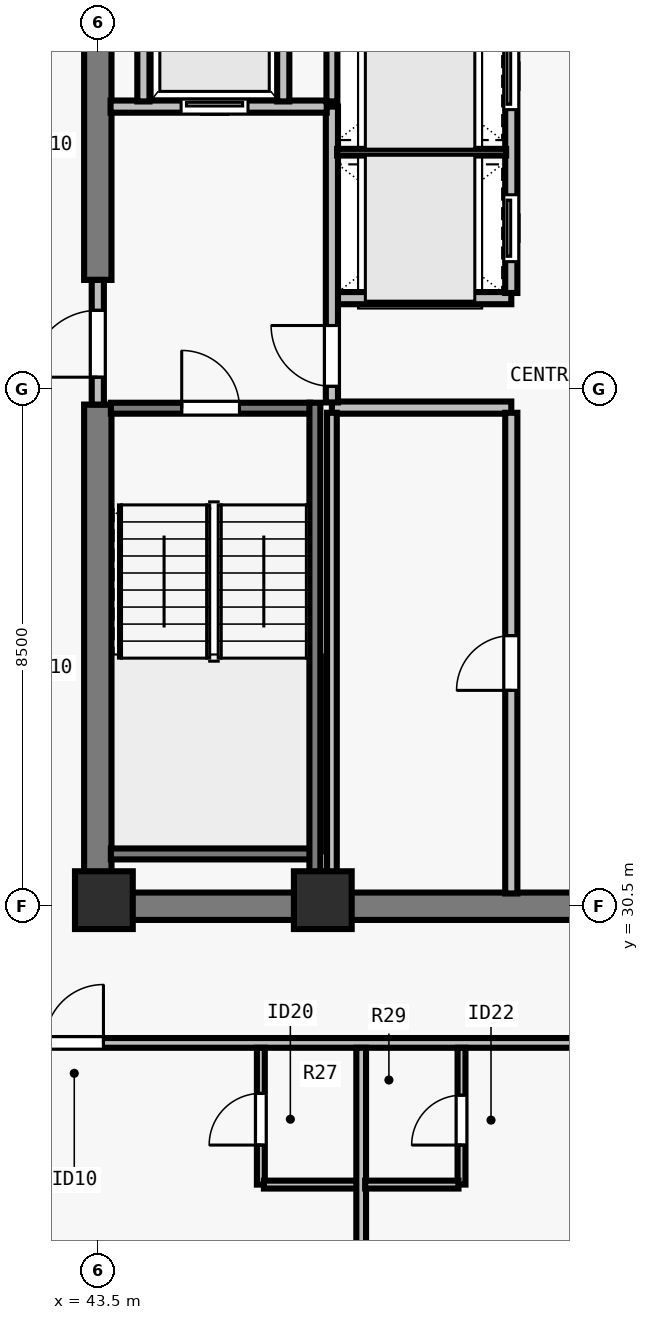
"""IFC4 building model, lengths in metres.
Left out: names, types, materials, properties, quantities, classifications, styles, units other than length and angle.
Written with IfcOpenShell. Run it as: python <this file> out.ifc"""

import sys

from ifc_helpers import new_model, si_unit, direction, frame, frame_2d, origin, origin_2d, place, context, subcontext, project, spatial, rectangle, extrude, element, fill, save


model = new_model("IFC4")
c1 = context("Model", 3, precision=1e-05, world=origin(), true_north=direction((0.0, 1.0)))
c2 = subcontext(c1, "Body", "Model", "MODEL_VIEW")
j1 = project(units=[si_unit("LENGTHUNIT", "METRE"), si_unit("PLANEANGLEUNIT", "RADIAN")], contexts=[c1])
p1 = place(None, origin())
s1 = spatial("IfcSite", under=j1, at=p1, CompositionType="ELEMENT")
p2 = place(p1, origin())
s2 = spatial("IfcBuilding", under=s1, at=p2, CompositionType="ELEMENT")
p3 = place(p2, frame((0.0, 0.0, 244.5)))
s3 = spatial("IfcBuildingStorey", under=s2, at=p3, CompositionType="ELEMENT", Elevation=244.5)
for number, where, z_axis, x_axis in (
    (1, (43.6, 30.6, 0.0), (0.0, 0.0, 1.0), (1.0, 0.0, 0.0)),
    (2, (47.2, 30.6, 0.0), (0.0, 0.0, 1.0), (1.0, 0.0, 0.0)),
):
    element("IfcColumn", number, at=place(p3, frame(where, z_axis=z_axis, x_axis=x_axis)), inside=s3, PredefinedType="COLUMN", context=c2, shape_type="SweptSolid", body=[
        extrude(rectangle(XDim=0.95, YDim=0.95, at=origin_2d()), origin(), (0.0, 0.0, 1.0), 3.5),
    ])
p4 = place(p3, frame((43.275, 30.5, 0.0), z_axis=(0.0, 0.0, 1.0), x_axis=(1.0, 0.0, 0.0)))
e3 = element("IfcWall", 3, at=p4, inside=s3, PredefinedType="SHEAR", context=c2, shape_type="SweptSolid", body=[
    extrude(rectangle(XDim=17.45, YDim=0.45, at=frame_2d((8.725, 0.0))), origin(), (0.0, 0.0, 1.0), 3.29),
])
p5 = place(p3, frame((43.5, 30.715, 0.0), z_axis=(0.0, 0.0, 1.0), x_axis=(0.0, 1.0, 0.0)))
e4 = element("IfcWall", 4, at=p5, inside=s3, PredefinedType="SHEAR", context=c2, shape_type="SweptSolid", body=[
    extrude(rectangle(XDim=8.035, YDim=0.45, at=frame_2d((4.018, 0.0))), origin(), (0.0, 0.0, 1.0), 3.29),
])
p6 = place(p3, frame((43.5, 40.8, 0.0), z_axis=(0.0, 0.0, 1.0), x_axis=(0.0, 1.0, 0.0)))
e5 = element("IfcWall", 5, at=p6, inside=s3, PredefinedType="SHEAR", context=c2, shape_type="SweptSolid", body=[
    extrude(rectangle(XDim=6.485, YDim=0.45, at=frame_2d((3.242, 0.0))), origin(), (0.0, 0.0, 1.0), 3.29),
])
for number, where, z_axis, x_axis in (
    (6, (47.35, 38.7, 0.0), (0.0, 0.0, 1.0), (1.0, 0.0, 0.0)),
    (7, (47.35, 40.5, 0.0), (0.0, 0.0, 1.0), (1.0, 0.0, 0.0)),
):
    element("IfcWall", number, at=place(p3, frame(where, z_axis=z_axis, x_axis=x_axis)), inside=s3, PredefinedType="SOLIDWALL", context=c2, shape_type="SweptSolid", body=[
        extrude(rectangle(XDim=2.95, YDim=0.2, at=frame_2d((1.475, 0.0))), origin(), (0.0, 0.0, 1.0), 3.29),
    ])
p7 = place(p3, frame((50.3, 30.71, 0.0), z_axis=(0.0, 0.0, 1.0), x_axis=(0.0, 1.0, 0.0)))
e8 = element("IfcWall", 8, at=p7, inside=s3, PredefinedType="SOLIDWALL", context=c2, shape_type="SweptSolid", body=[
    extrude(rectangle(XDim=7.905, YDim=0.2, at=frame_2d((3.953, 0.0))), origin(), (0.0, 0.0, 1.0), 3.29),
])
p8 = place(p7, frame((3.34, 0.0, 0.0)))
e9 = element("IfcOpeningElement", 9, at=p8, cuts=e8, PredefinedType="OPENING", context=c2, shape_type="SweptSolid", body=[
    extrude(rectangle(XDim=0.9, YDim=2.12, at=frame_2d((0.45, 1.06))), frame((0.0, 0.11, 0.0), z_axis=(0.0, -1.0, 0.0), x_axis=(1.0, 0.0, 0.0)), (0.0, 0.0, 1.0), 0.22),
])
p9 = place(p3, frame((50.3, 40.585, 0.0), z_axis=(0.0, 0.0, 1.0), x_axis=(0.0, 1.0, 0.0)))
e10 = element("IfcWall", 10, at=p9, inside=s3, PredefinedType="SOLIDWALL", context=c2, shape_type="SweptSolid", body=[
    extrude(rectangle(XDim=6.705, YDim=0.2, at=frame_2d((3.353, 0.0))), origin(), (0.0, 0.0, 1.0), 3.29),
])
p10 = place(p9, frame((0.515, 0.0, 0.0)))
e11 = element("IfcOpeningElement", 11, at=p10, cuts=e10, PredefinedType="OPENING", context=c2, shape_type="SweptSolid", body=[
    extrude(rectangle(XDim=1.1, YDim=2.2, at=frame_2d((0.55, 1.1))), frame((0.0, 0.11, 0.0), z_axis=(0.0, -1.0, 0.0), x_axis=(1.0, 0.0, 0.0)), (0.0, 0.0, 1.0), 0.22),
])
p11 = place(p9, frame((3.015, 0.0, 0.0)))
e12 = element("IfcOpeningElement", 12, at=p11, cuts=e10, PredefinedType="OPENING", context=c2, shape_type="SweptSolid", body=[
    extrude(rectangle(XDim=1.1, YDim=2.2, at=frame_2d((0.55, 1.1))), frame((0.0, 0.11, 0.0), z_axis=(0.0, -1.0, 0.0), x_axis=(1.0, 0.0, 0.0)), (0.0, 0.0, 1.0), 0.22),
])
p12 = place(p9, frame((5.065, 0.0, 0.0)))
e13 = element("IfcOpeningElement", 13, at=p12, cuts=e10, PredefinedType="OPENING", context=c2, shape_type="SweptSolid", body=[
    extrude(rectangle(XDim=0.8, YDim=2.08, at=frame_2d((0.4, 1.04))), frame((0.0, 0.11, 0.0), z_axis=(0.0, -1.0, 0.0), x_axis=(1.0, 0.0, 0.0)), (0.0, 0.0, 1.0), 0.22),
])
p13 = place(p3, frame((43.5, 38.75, 0.0), z_axis=(0.0, 0.0, 1.0), x_axis=(0.0, 1.0, 0.0)))
e14 = element("IfcWall", 14, at=p13, inside=s3, PredefinedType="SOLIDWALL", context=c2, shape_type="SweptSolid", body=[
    extrude(rectangle(XDim=2.05, YDim=0.2, at=frame_2d((1.025, 0.0))), origin(), (0.0, 0.0, 1.0), 3.29),
])
p14 = place(p13, frame((0.45, 0.0, 0.0)))
e15 = element("IfcOpeningElement", 15, at=p14, cuts=e14, PredefinedType="OPENING", context=c2, shape_type="SweptSolid", body=[
    extrude(rectangle(XDim=1.1, YDim=2.15, at=frame_2d((0.55, 1.075))), frame((0.0, 0.11, 0.0), z_axis=(0.0, -1.0, 0.0), x_axis=(1.0, 0.0, 0.0)), (0.0, 0.0, 1.0), 0.22),
])
p15 = place(p3, frame((47.35, 38.785, 0.0), z_axis=(0.0, 0.0, 1.0), x_axis=(0.0, 1.0, 0.0)))
e16 = element("IfcWall", 16, at=p15, inside=s3, PredefinedType="SOLIDWALL", context=c2, shape_type="SweptSolid", body=[
    extrude(rectangle(XDim=4.865, YDim=0.2, at=frame_2d((2.433, 0.0))), origin(), (0.0, 0.0, 1.0), 3.29),
])
p16 = place(p15, frame((0.265, 0.0, 0.0)))
e17 = element("IfcOpeningElement", 17, at=p16, cuts=e16, PredefinedType="OPENING", context=c2, shape_type="SweptSolid", body=[
    extrude(rectangle(XDim=1.0, YDim=2.15, at=frame_2d((0.5, 1.075))), frame((0.0, 0.11, 0.0), z_axis=(0.0, -1.0, 0.0), x_axis=(1.0, 0.0, 0.0)), (0.0, 0.0, 1.0), 0.22),
])
p17 = place(p3, frame((43.71, 43.65, 0.0), z_axis=(0.0, 0.0, 1.0), x_axis=(1.0, 0.0, 0.0)))
e18 = element("IfcWall", 18, at=p17, inside=s3, PredefinedType="SOLIDWALL", context=c2, shape_type="SweptSolid", body=[
    extrude(rectangle(XDim=3.555, YDim=0.2, at=frame_2d((1.777, 0.0))), origin(), (0.0, 0.0, 1.0), 3.29),
])
p18 = place(p17, frame((1.16, 0.0, 0.0)))
e19 = element("IfcOpeningElement", 19, at=p18, cuts=e18, PredefinedType="OPENING", context=c2, shape_type="SweptSolid", body=[
    extrude(rectangle(XDim=1.1, YDim=2.2, at=frame_2d((0.55, 1.1))), frame((0.0, 0.11, 0.0), z_axis=(0.0, -1.0, 0.0), x_axis=(1.0, 0.0, 0.0)), (0.0, 0.0, 1.0), 0.22),
])
for number, where, z_axis, x_axis in (
    (20, (46.55, 43.735, 0.0), (0.0, 0.0, 1.0), (0.0, 1.0, 0.0)),
    (21, (44.25, 43.735, 0.0), (0.0, 0.0, 1.0), (0.0, 1.0, 0.0)),
):
    element("IfcWall", number, at=place(p3, frame(where, z_axis=z_axis, x_axis=x_axis)), inside=s3, PredefinedType="SOLIDWALL", context=c2, shape_type="SweptSolid", body=[
        extrude(rectangle(XDim=3.555, YDim=0.2, at=frame_2d((1.777, 0.0))), origin(), (0.0, 0.0, 1.0), 3.29),
    ])
p19 = place(p3, frame((47.35, 30.71, 0.0), z_axis=(0.0, 0.0, 1.0), x_axis=(0.0, 1.0, 0.0)))
e22 = element("IfcWall", 22, at=p19, inside=s3, PredefinedType="PARTITIONING", context=c2, shape_type="SweptSolid", body=[
    extrude(rectangle(XDim=7.905, YDim=0.16, at=frame_2d((3.953, 0.0))), origin(), (0.0, 0.0, 1.0), 3.29),
])
p20 = place(p3, frame((47.35, 43.735, 0.0), z_axis=(0.0, 0.0, 1.0), x_axis=(0.0, 1.0, 0.0)))
e23 = element("IfcWall", 23, at=p20, inside=s3, PredefinedType="SOLIDWALL", context=c2, shape_type="SweptSolid", body=[
    extrude(rectangle(XDim=3.555, YDim=0.18, at=frame_2d((1.777, 0.0))), origin(), (0.0, 0.0, 1.0), 3.29),
])
p21 = place(p3, frame((47.435, 42.9, 0.0), z_axis=(0.0, 0.0, 1.0), x_axis=(1.0, 0.0, 0.0)))
e24 = element("IfcWall", 24, at=p21, inside=s3, PredefinedType="PARTITIONING", context=c2, shape_type="SweptSolid", body=[
    extrude(rectangle(XDim=2.78, YDim=0.11, at=frame_2d((1.39, 0.0))), origin(), (0.0, 0.0, 1.0), 3.29),
])
p22 = place(p3, frame((29.805, 28.252, 0.0), z_axis=(0.0, 0.0, 1.0), x_axis=(1.0, 0.0, 0.0)))
e25 = element("IfcWall", 25, at=p22, inside=s3, PredefinedType="PARTITIONING", context=c2, shape_type="SweptSolid", body=[
    extrude(rectangle(XDim=44.39, YDim=0.16, at=frame_2d((22.195, 0.0))), origin(), (0.0, 0.0, 1.0), 2.958),
])
p23 = place(p22, frame((3.872, 0.0, 0.0)))
e26 = element("IfcOpeningElement", 26, at=p23, cuts=e25, PredefinedType="OPENING", context=c2, shape_type="SweptSolid", body=[
    extrude(rectangle(XDim=0.96, YDim=2.18, at=frame_2d((0.48, 1.09))), frame((0.0, 0.09, 0.0), z_axis=(0.0, -1.0, 0.0), x_axis=(1.0, 0.0, 0.0)), (0.0, 0.0, 1.0), 0.18),
])
p24 = place(p22, frame((12.828, 0.0, 0.0)))
e27 = element("IfcOpeningElement", 27, at=p24, cuts=e25, PredefinedType="OPENING", context=c2, shape_type="SweptSolid", body=[
    extrude(rectangle(XDim=0.96, YDim=2.18, at=frame_2d((0.48, 1.09))), frame((0.0, 0.09, 0.0), z_axis=(0.0, -1.0, 0.0), x_axis=(1.0, 0.0, 0.0)), (0.0, 0.0, 1.0), 0.18),
])
p25 = place(p22, frame((21.66, 0.0, 0.0)))
e28 = element("IfcOpeningElement", 28, at=p25, cuts=e25, PredefinedType="OPENING", context=c2, shape_type="SweptSolid", body=[
    extrude(rectangle(XDim=0.96, YDim=2.18, at=frame_2d((0.48, 1.09))), frame((0.0, 0.09, 0.0), z_axis=(0.0, -1.0, 0.0), x_axis=(1.0, 0.0, 0.0)), (0.0, 0.0, 1.0), 0.18),
])
p26 = place(p22, frame((30.492, 0.0, 0.0)))
e29 = element("IfcOpeningElement", 29, at=p26, cuts=e25, PredefinedType="OPENING", context=c2, shape_type="SweptSolid", body=[
    extrude(rectangle(XDim=0.96, YDim=2.18, at=frame_2d((0.48, 1.09))), frame((0.0, 0.09, 0.0), z_axis=(0.0, -1.0, 0.0), x_axis=(1.0, 0.0, 0.0)), (0.0, 0.0, 1.0), 0.18),
])
p27 = place(p22, frame((39.503, 0.0, 0.0)))
e30 = element("IfcOpeningElement", 30, at=p27, cuts=e25, PredefinedType="OPENING", context=c2, shape_type="SweptSolid", body=[
    extrude(rectangle(XDim=0.96, YDim=2.18, at=frame_2d((0.48, 1.09))), frame((0.0, 0.09, 0.0), z_axis=(0.0, -1.0, 0.0), x_axis=(1.0, 0.0, 0.0)), (0.0, 0.0, 1.0), 0.18),
])
p28 = place(p3, frame((46.181, 25.923, 0.0), z_axis=(0.0, 0.0, 1.0), x_axis=(0.0, 1.0, 0.0)))
e31 = element("IfcWall", 31, at=p28, inside=s3, PredefinedType="PLUMBINGWALL", context=c2, shape_type="SweptSolid", body=[
    extrude(rectangle(XDim=2.25, YDim=0.13, at=frame_2d((1.125, 0.0))), origin(), (0.0, 0.0, 1.0), 3.29),
])
p29 = place(p28, frame((0.65, 0.0, 0.0)))
e32 = element("IfcOpeningElement", 32, at=p29, cuts=e31, PredefinedType="OPENING", context=c2, shape_type="SweptSolid", body=[
    extrude(rectangle(XDim=0.85, YDim=2.1, at=frame_2d((0.425, 1.05))), frame((0.0, 0.075, 0.0), z_axis=(0.0, -1.0, 0.0), x_axis=(1.0, 0.0, 0.0)), (0.0, 0.0, 1.0), 0.15),
])
p30 = place(p3, frame((46.231, 25.923, 0.0), z_axis=(0.0, 0.0, 1.0), x_axis=(1.0, 0.0, 0.0)))
e33 = element("IfcWall", 33, at=p30, inside=s3, PredefinedType="PLUMBINGWALL", context=c2, shape_type="SweptSolid", body=[
    extrude(rectangle(XDim=1.6, YDim=0.13, at=frame_2d((0.8, 0.0))), origin(), (0.0, 0.0, 1.0), 3.29),
])
p31 = place(p3, frame((47.832, 16.805, 0.0), z_axis=(0.0, 0.0, 1.0), x_axis=(0.0, 1.0, 0.0)))
e34 = element("IfcWall", 34, at=p31, inside=s3, PredefinedType="PARTITIONING", context=c2, shape_type="SweptSolid", body=[
    extrude(rectangle(XDim=11.368, YDim=0.16, at=frame_2d((5.684, 0.0))), origin(), (0.0, 0.0, 1.0), 2.958),
])
p32 = place(p3, frame((49.481, 25.923, 0.0), z_axis=(0.0, 0.0, 1.0), x_axis=(0.0, 1.0, 0.0)))
e35 = element("IfcWall", 35, at=p32, inside=s3, PredefinedType="PLUMBINGWALL", context=c2, shape_type="SweptSolid", body=[
    extrude(rectangle(XDim=2.25, YDim=0.13, at=frame_2d((1.125, 0.0))), origin(), (0.0, 0.0, 1.0), 3.29),
])
p33 = place(p32, frame((0.65, 0.0, 0.0)))
e36 = element("IfcOpeningElement", 36, at=p33, cuts=e35, PredefinedType="OPENING", context=c2, shape_type="SweptSolid", body=[
    extrude(rectangle(XDim=0.82, YDim=2.1, at=frame_2d((0.41, 1.05))), frame((0.0, 0.075, 0.0), z_axis=(0.0, -1.0, 0.0), x_axis=(1.0, 0.0, 0.0)), (0.0, 0.0, 1.0), 0.15),
])
p34 = place(p3, frame((47.896, 25.923, 0.0), z_axis=(0.0, 0.0, 1.0), x_axis=(1.0, 0.0, 0.0)))
e37 = element("IfcWall", 37, at=p34, inside=s3, PredefinedType="PLUMBINGWALL", context=c2, shape_type="SweptSolid", body=[
    extrude(rectangle(XDim=1.535, YDim=0.13, at=frame_2d((0.768, 0.0))), origin(), (0.0, 0.0, 1.0), 3.29),
])
p35 = place(p3, frame((43.715, 38.69, 0.0), z_axis=(0.0, 0.0, 1.0), x_axis=(1.0, 0.0, 0.0)))
e38 = element("IfcWall", 38, at=p35, inside=s3, PredefinedType="SOLIDWALL", context=c2, shape_type="SweptSolid", body=[
    extrude(rectangle(XDim=3.28, YDim=0.18, at=frame_2d((1.64, 0.0))), origin(), (0.0, 0.0, 1.0), 3.29),
])
p36 = place(p35, frame((1.165, 0.0, 0.0)))
e39 = element("IfcOpeningElement", 39, at=p36, cuts=e38, PredefinedType="OPENING", context=c2, shape_type="SweptSolid", body=[
    extrude(rectangle(XDim=0.95, YDim=2.15, at=frame_2d((0.475, 1.075))), frame((0.0, 0.1, 0.0), z_axis=(0.0, -1.0, 0.0), x_axis=(1.0, 0.0, 0.0)), (0.0, 0.0, 1.0), 0.2),
])
p37 = place(p3, frame((43.715, 31.36, 0.0), z_axis=(0.0, 0.0, 1.0), x_axis=(1.0, 0.0, 0.0)))
e40 = element("IfcWall", 40, at=p37, inside=s3, PredefinedType="SOLIDWALL", context=c2, shape_type="SweptSolid", body=[
    extrude(rectangle(XDim=3.28, YDim=0.18, at=frame_2d((1.64, 0.0))), origin(), (0.0, 0.0, 1.0), 3.29),
])
p38 = place(p3, frame((47.07, 38.78, 0.0), z_axis=(0.0, 0.0, 1.0), x_axis=(0.0, -1.0, 0.0)))
e41 = element("IfcWall", 41, at=p38, inside=s3, PredefinedType="SOLIDWALL", context=c2, shape_type="SweptSolid", body=[
    extrude(rectangle(XDim=8.067, YDim=0.18, at=frame_2d((4.034, 0.0))), origin(), (0.0, 0.0, 1.0), 3.29),
])
p39 = place(p14, origin())
e42 = element("IfcDoor", 42, at=p39, inside=s3, OperationType="SINGLE_SWING_LEFT", PredefinedType="DOOR", context=c2, shape_type="SweptSolid", body=[
    extrude(rectangle(XDim=1.1, YDim=2.15, at=frame_2d((0.55, 1.075))), frame((0.0, 0.025, 0.0), z_axis=(0.0, -1.0, 0.0), x_axis=(1.0, 0.0, 0.0)), (0.0, 0.0, 1.0), 0.05),
])
fill(e15, e42)
p40 = place(p16, origin())
e43 = element("IfcDoor", 43, at=p40, inside=s3, OperationType="SINGLE_SWING_RIGHT", PredefinedType="DOOR", context=c2, shape_type="SweptSolid", body=[
    extrude(rectangle(XDim=1.0, YDim=2.15, at=frame_2d((0.5, 1.075))), frame((0.0, 0.025, 0.0), z_axis=(0.0, -1.0, 0.0), x_axis=(1.0, 0.0, 0.0)), (0.0, 0.0, 1.0), 0.05),
])
fill(e17, e43)
p41 = place(p18, origin())
e44 = element("IfcDoor", 44, at=p41, inside=s3, OperationType="SLIDING_TO_LEFT", PredefinedType="DOOR", context=c2, shape_type="SweptSolid", body=[
    extrude(rectangle(XDim=1.1, YDim=2.2, at=frame_2d((0.55, 1.1))), frame((0.0, 0.025, 0.0), z_axis=(0.0, -1.0, 0.0), x_axis=(1.0, 0.0, 0.0)), (0.0, 0.0, 1.0), 0.05),
])
fill(e19, e44)
p42 = place(p8, origin())
e45 = element("IfcDoor", 45, at=p42, inside=s3, OperationType="SINGLE_SWING_LEFT", PredefinedType="DOOR", context=c2, shape_type="SweptSolid", body=[
    extrude(rectangle(XDim=0.9, YDim=2.12, at=frame_2d((0.45, 1.06))), frame((0.0, 0.025, 0.0), z_axis=(0.0, -1.0, 0.0), x_axis=(1.0, 0.0, 0.0)), (0.0, 0.0, 1.0), 0.05),
])
fill(e9, e45)
p43 = place(p10, origin())
e46 = element("IfcDoor", 46, at=p43, inside=s3, OperationType="SLIDING_TO_LEFT", PredefinedType="DOOR", context=c2, shape_type="SweptSolid", body=[
    extrude(rectangle(XDim=1.1, YDim=2.2, at=frame_2d((0.55, 1.1))), frame((0.0, 0.025, 0.0), z_axis=(0.0, -1.0, 0.0), x_axis=(1.0, 0.0, 0.0)), (0.0, 0.0, 1.0), 0.05),
])
fill(e11, e46)
p44 = place(p11, origin())
e47 = element("IfcDoor", 47, at=p44, inside=s3, OperationType="SLIDING_TO_LEFT", PredefinedType="DOOR", context=c2, shape_type="SweptSolid", body=[
    extrude(rectangle(XDim=1.1, YDim=2.2, at=frame_2d((0.55, 1.1))), frame((0.0, 0.025, 0.0), z_axis=(0.0, -1.0, 0.0), x_axis=(1.0, 0.0, 0.0)), (0.0, 0.0, 1.0), 0.05),
])
fill(e12, e47)
p45 = place(p29, origin())
e48 = element("IfcDoor", 48, at=p45, inside=s3, OperationType="SINGLE_SWING_LEFT", PredefinedType="DOOR", context=c2, shape_type="SweptSolid", body=[
    extrude(rectangle(XDim=0.85, YDim=2.1, at=frame_2d((0.425, 1.05))), frame((0.0, 0.025, 0.0), z_axis=(0.0, -1.0, 0.0), x_axis=(1.0, 0.0, 0.0)), (0.0, 0.0, 1.0), 0.05),
])
fill(e32, e48)
p46 = place(p24, origin())
e49 = element("IfcDoor", 49, at=p46, inside=s3, OperationType="SINGLE_SWING_RIGHT", PredefinedType="DOOR", context=c2, shape_type="SweptSolid", body=[
    extrude(rectangle(XDim=0.96, YDim=2.18, at=frame_2d((0.48, 1.09))), frame((0.0, 0.025, 0.0), z_axis=(0.0, -1.0, 0.0), x_axis=(1.0, 0.0, 0.0)), (0.0, 0.0, 1.0), 0.05),
])
fill(e27, e49)
p47 = place(p33, origin())
e50 = element("IfcDoor", 50, at=p47, inside=s3, OperationType="SINGLE_SWING_LEFT", PredefinedType="DOOR", context=c2, shape_type="SweptSolid", body=[
    extrude(rectangle(XDim=0.82, YDim=2.1, at=frame_2d((0.41, 1.05))), frame((0.0, 0.025, 0.0), z_axis=(0.0, -1.0, 0.0), x_axis=(1.0, 0.0, 0.0)), (0.0, 0.0, 1.0), 0.05),
])
fill(e36, e50)
p48 = place(p36, origin())
e51 = element("IfcDoor", 51, at=p48, inside=s3, OperationType="SINGLE_SWING_LEFT", PredefinedType="DOOR", context=c2, shape_type="SweptSolid", body=[
    extrude(rectangle(XDim=0.95, YDim=2.15, at=frame_2d((0.475, 1.075))), frame((0.0, 0.025, 0.0), z_axis=(0.0, -1.0, 0.0), x_axis=(1.0, 0.0, 0.0)), (0.0, 0.0, 1.0), 0.05),
])
fill(e39, e51)
save(model, sys.argv[1])
